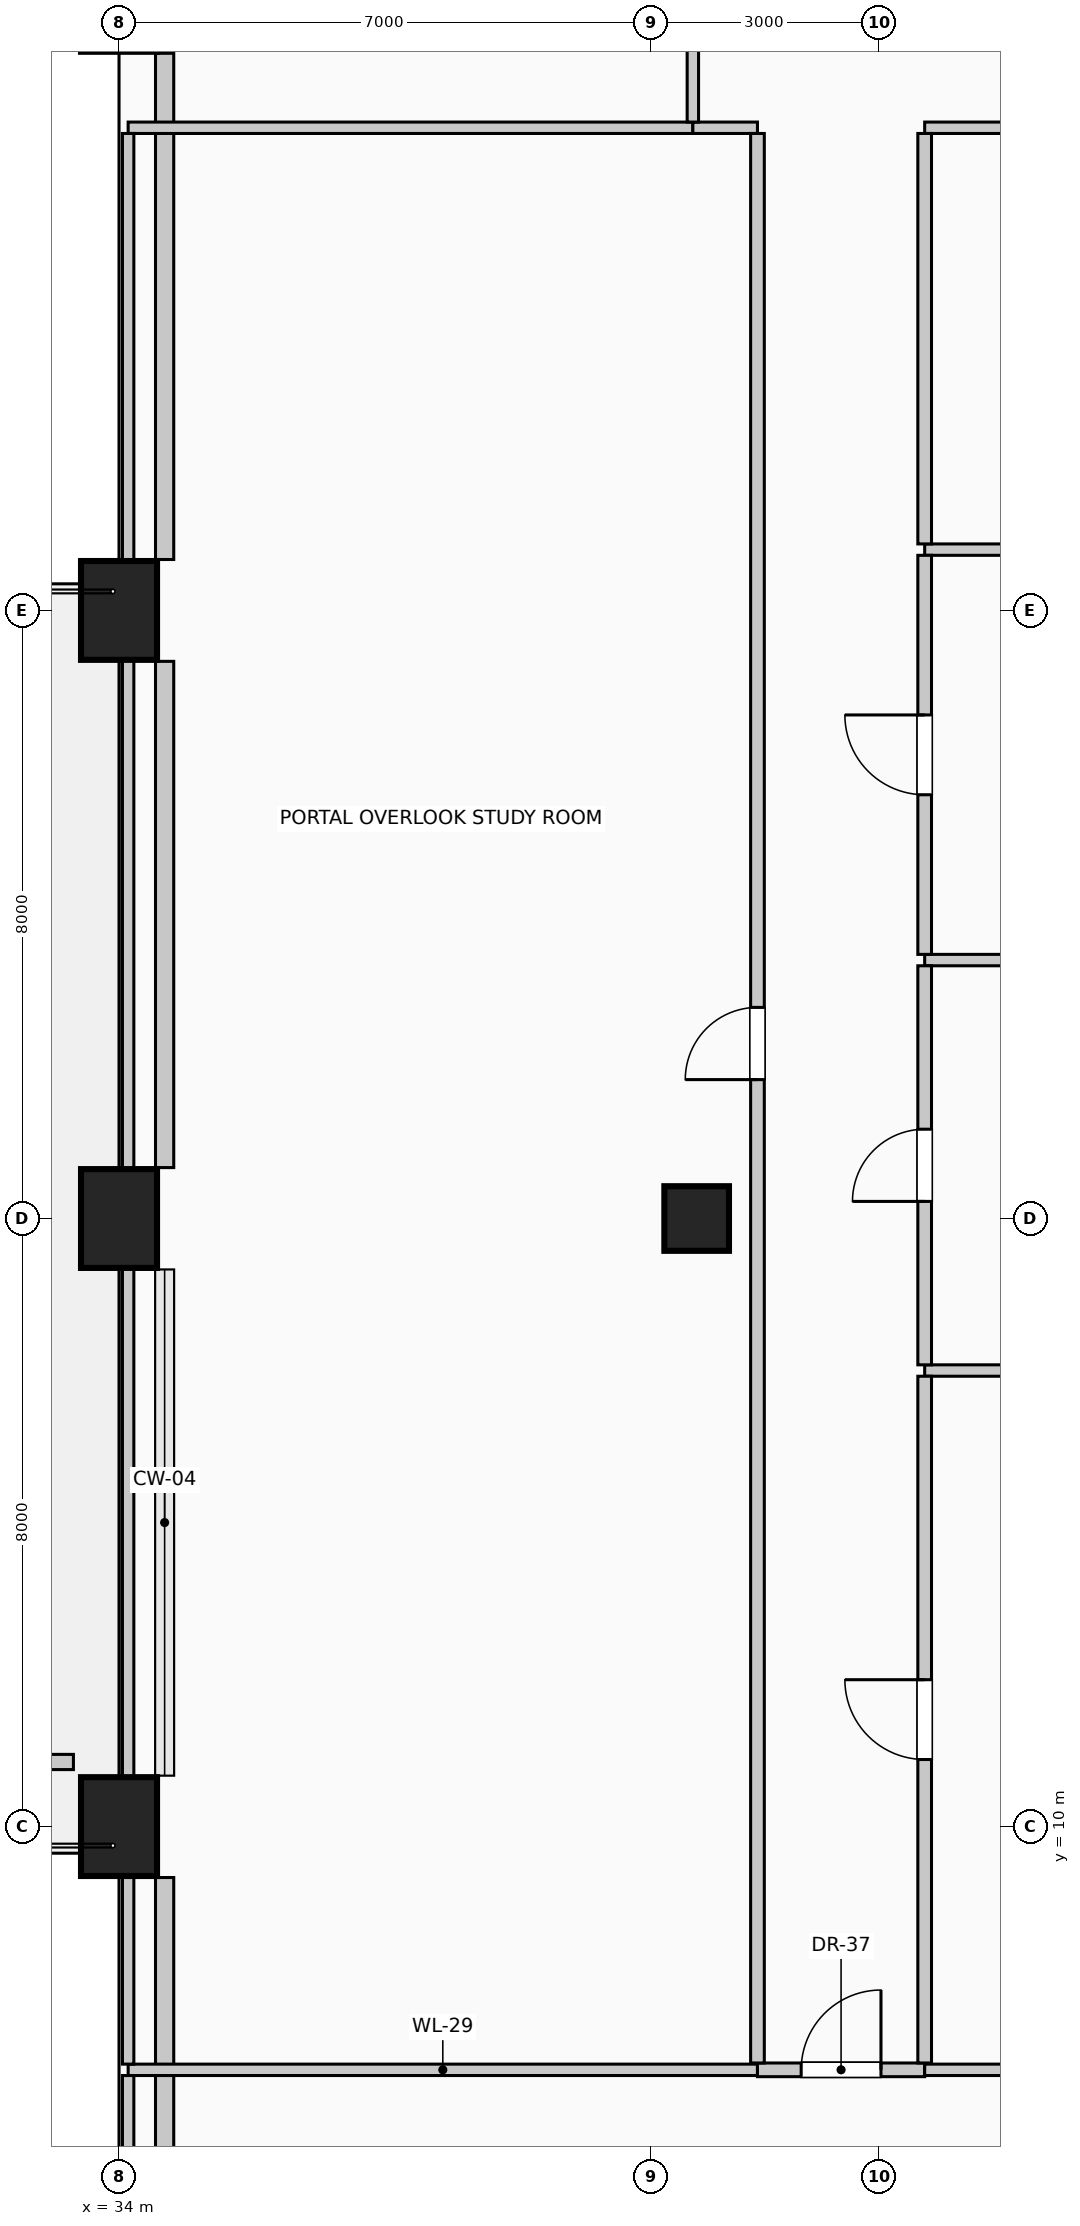
"""IFC4 building model, lengths in metres.
Left out: names, types, materials, properties, quantities, classifications, styles, units other than length and angle.
Written with IfcOpenShell. Run it as: python <this file> out.ifc"""

import sys

from ifc_helpers import new_model, si_unit, direction, frame, frame_2d, origin, origin_2d, place, context, subcontext, project, spatial, rectangle, circle, extrude, element, fill, save


model = new_model("IFC4")
c1 = context("Model", 3, precision=1e-05, world=origin(), true_north=direction((0.0, 1.0)))
c2 = subcontext(c1, "Body", "Model", "MODEL_VIEW")
j1 = project(units=[si_unit("LENGTHUNIT", "METRE"), si_unit("PLANEANGLEUNIT", "RADIAN")], contexts=[c1])
p1 = place(None, origin())
s1 = spatial("IfcSite", under=j1, at=p1, CompositionType="ELEMENT")
p2 = place(p1, origin())
s2 = spatial("IfcBuilding", under=s1, at=p2, CompositionType="ELEMENT")
p3 = place(p2, frame((0.0, 0.0, 182.6)))
s3 = spatial("IfcBuildingStorey", under=s2, at=p3, CompositionType="ELEMENT", Elevation=182.6)
for number, where, z_axis, x_axis in (
    (1, (34.0, 10.0, 0.0), (0.0, 0.0, 1.0), (1.0, 0.0, 0.0)),
    (2, (34.0, 18.0, 0.0), (0.0, 0.0, 1.0), (1.0, 0.0, 0.0)),
    (3, (34.0, 26.0, 0.0), (0.0, 0.0, 1.0), (1.0, 0.0, 0.0)),
    (4, (34.0, 34.0, 0.0), (0.0, 0.0, 1.0), (1.0, 0.0, 0.0)),
):
    element("IfcColumn", number, at=place(p3, frame(where, z_axis=z_axis, x_axis=x_axis)), inside=s3, PredefinedType="COLUMN", context=c2, shape_type="SweptSolid", body=[
        extrude(rectangle(XDim=1.0, YDim=1.3, at=origin_2d()), origin(), (0.0, 0.0, 1.0), 4.0),
    ])
p4 = place(p3, frame((41.6, 18.0, 0.0), z_axis=(0.0, 0.0, 1.0), x_axis=(1.0, 0.0, 0.0)))
e5 = element("IfcColumn", 5, at=p4, inside=s3, PredefinedType="COLUMN", context=c2, shape_type="SweptSolid", body=[
    extrude(circle(Radius=0.425, at=origin_2d()), origin(), (0.0, 0.0, 1.0), 4.0),
])
p5 = place(p3, frame((34.6, 1.27, 0.0), z_axis=(0.0, 0.0, 1.0), x_axis=(0.0, 1.0, 0.0)))
e6 = element("IfcWall", 6, at=p5, inside=s3, PredefinedType="SOLIDWALL", context=c2, shape_type="SweptSolid", body=[
    extrude(rectangle(XDim=8.06, YDim=0.24, at=frame_2d((4.03, 0.0))), origin(), (0.0, 0.0, 1.0), 3.75),
])
p6 = place(p5, frame((1.22, 0.0, 0.42)))
e7 = element("IfcOpeningElement", 7, at=p6, cuts=e6, PredefinedType="OPENING", context=c2, shape_type="SweptSolid", body=[
    extrude(rectangle(XDim=2.2, YDim=1.95, at=frame_2d((1.1, 0.975))), frame((0.0, 0.13, 0.0), z_axis=(0.0, -1.0, 0.0), x_axis=(1.0, 0.0, 0.0)), (0.0, 0.0, 1.0), 0.26),
])
for number, where, z_axis, x_axis in (
    (8, (34.6, 18.67, 0.0), (0.0, 0.0, 1.0), (0.0, 1.0, 0.0)),
    (9, (34.6, 26.67, 0.0), (0.0, 0.0, 1.0), (0.0, 1.0, 0.0)),
):
    element("IfcWall", number, at=place(p3, frame(where, z_axis=z_axis, x_axis=x_axis)), inside=s3, PredefinedType="SOLIDWALL", context=c2, shape_type="SweptSolid", body=[
        extrude(rectangle(XDim=6.66, YDim=0.24, at=frame_2d((3.33, 0.0))), origin(), (0.0, 0.0, 1.0), 3.75),
    ])
p7 = place(p3, frame((24.6, 10.85, 0.0), z_axis=(0.0, 0.0, 1.0), x_axis=(1.0, 0.0, 0.0)))
e10 = element("IfcWall", 10, at=p7, inside=s3, PredefinedType="USERDEFINED", context=c2, shape_type="SweptSolid", body=[
    extrude(rectangle(XDim=8.8, YDim=0.2, at=frame_2d((4.4, 0.0))), origin(), (0.0, 0.0, 1.0), 0.55),
])
p8 = place(p3, frame((34.12, 6.8, 0.0), z_axis=(0.0, 0.0, 1.0), x_axis=(1.0, 0.0, 0.0)))
e11 = element("IfcWall", 11, at=p8, inside=s3, PredefinedType="PARTITIONING", context=c2, shape_type="SweptSolid", body=[
    extrude(rectangle(XDim=8.28, YDim=0.15, at=frame_2d((4.14, 0.0))), origin(), (0.0, 0.0, 1.0), 3.245),
])
p9 = place(p3, frame((42.4, 6.8, 0.0), z_axis=(0.0, 0.0, 1.0), x_axis=(1.0, 0.0, 0.0)))
e12 = element("IfcWall", 12, at=p9, inside=s3, PredefinedType="PARTITIONING", context=c2, shape_type="SweptSolid", body=[
    extrude(rectangle(XDim=2.2, YDim=0.18, at=frame_2d((1.1, 0.0))), origin(), (0.0, 0.0, 1.0), 3.245),
])
p10 = place(p9, frame((0.575, 0.0, 0.0)))
e13 = element("IfcOpeningElement", 13, at=p10, cuts=e12, PredefinedType="OPENING", context=c2, shape_type="SweptSolid", body=[
    extrude(rectangle(XDim=1.05, YDim=2.15, at=frame_2d((0.525, 1.075))), frame((0.0, 0.1, 0.0), z_axis=(0.0, -1.0, 0.0), x_axis=(1.0, 0.0, 0.0)), (0.0, 0.0, 1.0), 0.2),
])
p11 = place(p3, frame((44.6, 6.8, 0.0), z_axis=(0.0, 0.0, 1.0), x_axis=(1.0, 0.0, 0.0)))
e14 = element("IfcWall", 14, at=p11, inside=s3, PredefinedType="PARTITIONING", context=c2, shape_type="SweptSolid", body=[
    extrude(rectangle(XDim=12.68, YDim=0.15, at=frame_2d((6.34, 0.0))), origin(), (0.0, 0.0, 1.0), 3.245),
])
for number, where, z_axis, x_axis in (
    (15, (44.6, 16.0, 0.0), (0.0, 0.0, 1.0), (1.0, 0.0, 0.0)),
    (16, (44.6, 21.4, 0.0), (0.0, 0.0, 1.0), (1.0, 0.0, 0.0)),
):
    element("IfcWall", number, at=place(p3, frame(where, z_axis=z_axis, x_axis=x_axis)), inside=s3, PredefinedType="PARTITIONING", context=c2, shape_type="SweptSolid", body=[
        extrude(rectangle(XDim=12.68, YDim=0.15, at=frame_2d((6.34, 0.0))), origin(), (0.0, 0.0, 1.0), 3.75),
    ])
p12 = place(p3, frame((44.6, 26.8, 0.0), z_axis=(0.0, 0.0, 1.0), x_axis=(1.0, 0.0, 0.0)))
e17 = element("IfcWall", 17, at=p12, inside=s3, PredefinedType="PARTITIONING", context=c2, shape_type="SweptSolid", body=[
    extrude(rectangle(XDim=7.7, YDim=0.15, at=frame_2d((3.85, 0.0))), origin(), (0.0, 0.0, 1.0), 3.75),
])
p13 = place(p3, frame((34.12, 32.35, 0.0), z_axis=(0.0, 0.0, 1.0), x_axis=(1.0, 0.0, 0.0)))
e18 = element("IfcWall", 18, at=p13, inside=s3, PredefinedType="PARTITIONING", context=c2, shape_type="SweptSolid", body=[
    extrude(rectangle(XDim=7.43, YDim=0.15, at=frame_2d((3.715, 0.0))), origin(), (0.0, 0.0, 1.0), 3.75),
])
p14 = place(p3, frame((41.55, 32.35, 0.0), z_axis=(0.0, 0.0, 1.0), x_axis=(1.0, 0.0, 0.0)))
e19 = element("IfcWall", 19, at=p14, inside=s3, PredefinedType="PARTITIONING", context=c2, shape_type="SweptSolid", body=[
    extrude(rectangle(XDim=0.85, YDim=0.15, at=frame_2d((0.425, 0.0))), origin(), (0.0, 0.0, 1.0), 3.75),
])
p15 = place(p3, frame((44.6, 32.35, 0.0), z_axis=(0.0, 0.0, 1.0), x_axis=(1.0, 0.0, 0.0)))
e20 = element("IfcWall", 20, at=p15, inside=s3, PredefinedType="PARTITIONING", context=c2, shape_type="SweptSolid", body=[
    extrude(rectangle(XDim=7.7, YDim=0.15, at=frame_2d((3.85, 0.0))), origin(), (0.0, 0.0, 1.0), 3.75),
])
p16 = place(p15, frame((3.375, 0.0, 0.0)))
e21 = element("IfcOpeningElement", 21, at=p16, cuts=e20, PredefinedType="OPENING", context=c2, shape_type="SweptSolid", body=[
    extrude(rectangle(XDim=0.95, YDim=2.15, at=frame_2d((0.475, 1.075))), frame((0.0, 0.085, 0.0), z_axis=(0.0, -1.0, 0.0), x_axis=(1.0, 0.0, 0.0)), (0.0, 0.0, 1.0), 0.17),
])
p17 = place(p3, frame((34.12, 1.25, 0.0), z_axis=(0.0, 0.0, 1.0), x_axis=(0.0, 1.0, 0.0)))
e22 = element("IfcWall", 22, at=p17, inside=s3, PredefinedType="PARTITIONING", context=c2, shape_type="SweptSolid", body=[
    extrude(rectangle(XDim=5.475, YDim=0.15, at=frame_2d((2.738, 0.0))), origin(), (0.0, 0.0, 1.0), 3.145),
])
p18 = place(p3, frame((34.12, 6.875, 0.0), z_axis=(0.0, 0.0, 1.0), x_axis=(0.0, 1.0, 0.0)))
e23 = element("IfcWall", 23, at=p18, inside=s3, PredefinedType="PARTITIONING", context=c2, shape_type="SweptSolid", body=[
    extrude(rectangle(XDim=2.475, YDim=0.15, at=frame_2d((1.238, 0.0))), origin(), (0.0, 0.0, 1.0), 3.145),
])
for number, where, z_axis, x_axis in (
    (24, (34.12, 10.65, 0.0), (0.0, 0.0, 1.0), (0.0, 1.0, 0.0)),
    (25, (34.12, 18.65, 0.0), (0.0, 0.0, 1.0), (0.0, 1.0, 0.0)),
):
    element("IfcWall", number, at=place(p3, frame(where, z_axis=z_axis, x_axis=x_axis)), inside=s3, PredefinedType="PARTITIONING", context=c2, shape_type="SweptSolid", body=[
        extrude(rectangle(XDim=6.7, YDim=0.15, at=frame_2d((3.35, 0.0))), origin(), (0.0, 0.0, 1.0), 3.145),
    ])
p19 = place(p3, frame((34.12, 26.65, 0.0), z_axis=(0.0, 0.0, 1.0), x_axis=(0.0, 1.0, 0.0)))
e26 = element("IfcWall", 26, at=p19, inside=s3, PredefinedType="PARTITIONING", context=c2, shape_type="SweptSolid", body=[
    extrude(rectangle(XDim=5.625, YDim=0.15, at=frame_2d((2.812, 0.0))), origin(), (0.0, 0.0, 1.0), 3.145),
])
p20 = place(p3, frame((41.55, 32.425, 0.0), z_axis=(0.0, 0.0, 1.0), x_axis=(0.0, 1.0, 0.0)))
e27 = element("IfcWall", 27, at=p20, inside=s3, PredefinedType="PARTITIONING", context=c2, shape_type="SweptSolid", body=[
    extrude(rectangle(XDim=1.15, YDim=0.15, at=frame_2d((0.575, 0.0))), origin(), (0.0, 0.0, 1.0), 3.145),
])
p21 = place(p3, frame((42.4, 6.89, 0.0), z_axis=(0.0, 0.0, 1.0), x_axis=(0.0, 1.0, 0.0)))
e28 = element("IfcWall", 28, at=p21, inside=s3, PredefinedType="PARTITIONING", context=c2, shape_type="SweptSolid", body=[
    extrude(rectangle(XDim=25.385, YDim=0.18, at=frame_2d((12.692, 0.0))), origin(), (0.0, 0.0, 1.0), 3.75),
])
p22 = place(p21, frame((12.938, 0.0, 0.0)))
e29 = element("IfcOpeningElement", 29, at=p22, cuts=e28, PredefinedType="OPENING", context=c2, shape_type="SweptSolid", body=[
    extrude(rectangle(XDim=0.95, YDim=2.15, at=frame_2d((0.475, 1.075))), frame((0.0, 0.1, 0.0), z_axis=(0.0, -1.0, 0.0), x_axis=(1.0, 0.0, 0.0)), (0.0, 0.0, 1.0), 0.2),
])
p23 = place(p3, frame((44.6, 6.89, 0.0), z_axis=(0.0, 0.0, 1.0), x_axis=(0.0, 1.0, 0.0)))
e30 = element("IfcWall", 30, at=p23, inside=s3, PredefinedType="PARTITIONING", context=c2, shape_type="SweptSolid", body=[
    extrude(rectangle(XDim=9.035, YDim=0.18, at=frame_2d((4.518, 0.0))), origin(), (0.0, 0.0, 1.0), 3.75),
])
p24 = place(p23, frame((3.992, 0.0, 0.0)))
e31 = element("IfcOpeningElement", 31, at=p24, cuts=e30, PredefinedType="OPENING", context=c2, shape_type="SweptSolid", body=[
    extrude(rectangle(XDim=1.05, YDim=2.15, at=frame_2d((0.525, 1.075))), frame((0.0, 0.1, 0.0), z_axis=(0.0, -1.0, 0.0), x_axis=(1.0, 0.0, 0.0)), (0.0, 0.0, 1.0), 0.2),
])
p25 = place(p3, frame((44.6, 16.075, 0.0), z_axis=(0.0, 0.0, 1.0), x_axis=(0.0, 1.0, 0.0)))
e32 = element("IfcWall", 32, at=p25, inside=s3, PredefinedType="PARTITIONING", context=c2, shape_type="SweptSolid", body=[
    extrude(rectangle(XDim=5.25, YDim=0.18, at=frame_2d((2.625, 0.0))), origin(), (0.0, 0.0, 1.0), 3.75),
])
p26 = place(p25, frame((2.15, 0.0, 0.0)))
e33 = element("IfcOpeningElement", 33, at=p26, cuts=e32, PredefinedType="OPENING", context=c2, shape_type="SweptSolid", body=[
    extrude(rectangle(XDim=0.95, YDim=2.15, at=frame_2d((0.475, 1.075))), frame((0.0, 0.1, 0.0), z_axis=(0.0, -1.0, 0.0), x_axis=(1.0, 0.0, 0.0)), (0.0, 0.0, 1.0), 0.2),
])
p27 = place(p3, frame((44.6, 21.475, 0.0), z_axis=(0.0, 0.0, 1.0), x_axis=(0.0, 1.0, 0.0)))
e34 = element("IfcWall", 34, at=p27, inside=s3, PredefinedType="PARTITIONING", context=c2, shape_type="SweptSolid", body=[
    extrude(rectangle(XDim=5.25, YDim=0.18, at=frame_2d((2.625, 0.0))), origin(), (0.0, 0.0, 1.0), 3.75),
])
p28 = place(p27, frame((2.1, 0.0, 0.0)))
e35 = element("IfcOpeningElement", 35, at=p28, cuts=e34, PredefinedType="OPENING", context=c2, shape_type="SweptSolid", body=[
    extrude(rectangle(XDim=1.05, YDim=2.15, at=frame_2d((0.525, 1.075))), frame((0.0, 0.1, 0.0), z_axis=(0.0, -1.0, 0.0), x_axis=(1.0, 0.0, 0.0)), (0.0, 0.0, 1.0), 0.2),
])
p29 = place(p3, frame((44.6, 26.875, 0.0), z_axis=(0.0, 0.0, 1.0), x_axis=(0.0, 1.0, 0.0)))
e36 = element("IfcWall", 36, at=p29, inside=s3, PredefinedType="PARTITIONING", context=c2, shape_type="SweptSolid", body=[
    extrude(rectangle(XDim=5.4, YDim=0.18, at=frame_2d((2.7, 0.0))), origin(), (0.0, 0.0, 1.0), 3.75),
])
p30 = place(p10, origin())
e37 = element("IfcDoor", 37, at=p30, inside=s3, OperationType="SINGLE_SWING_RIGHT", PredefinedType="DOOR", context=c2, shape_type="SweptSolid", body=[
    extrude(rectangle(XDim=1.05, YDim=2.15, at=frame_2d((0.525, 1.075))), frame((0.0, 0.025, 0.0), z_axis=(0.0, -1.0, 0.0), x_axis=(1.0, 0.0, 0.0)), (0.0, 0.0, 1.0), 0.05),
])
fill(e13, e37)
p31 = place(p22, origin())
e38 = element("IfcDoor", 38, at=p31, inside=s3, OperationType="SINGLE_SWING_LEFT", PredefinedType="DOOR", context=c2, shape_type="SweptSolid", body=[
    extrude(rectangle(XDim=0.95, YDim=2.15, at=frame_2d((0.475, 1.075))), frame((0.0, 0.025, 0.0), z_axis=(0.0, -1.0, 0.0), x_axis=(1.0, 0.0, 0.0)), (0.0, 0.0, 1.0), 0.05),
])
fill(e29, e38)
p32 = place(p24, origin())
e39 = element("IfcDoor", 39, at=p32, inside=s3, OperationType="SINGLE_SWING_RIGHT", PredefinedType="DOOR", context=c2, shape_type="SweptSolid", body=[
    extrude(rectangle(XDim=1.05, YDim=2.15, at=frame_2d((0.525, 1.075))), frame((0.0, 0.025, 0.0), z_axis=(0.0, -1.0, 0.0), x_axis=(1.0, 0.0, 0.0)), (0.0, 0.0, 1.0), 0.05),
])
fill(e31, e39)
p33 = place(p26, origin())
e40 = element("IfcDoor", 40, at=p33, inside=s3, OperationType="SINGLE_SWING_LEFT", PredefinedType="DOOR", context=c2, shape_type="SweptSolid", body=[
    extrude(rectangle(XDim=0.95, YDim=2.15, at=frame_2d((0.475, 1.075))), frame((0.0, 0.025, 0.0), z_axis=(0.0, -1.0, 0.0), x_axis=(1.0, 0.0, 0.0)), (0.0, 0.0, 1.0), 0.05),
])
fill(e33, e40)
p34 = place(p28, origin())
e41 = element("IfcDoor", 41, at=p34, inside=s3, OperationType="SINGLE_SWING_RIGHT", PredefinedType="DOOR", context=c2, shape_type="SweptSolid", body=[
    extrude(rectangle(XDim=1.05, YDim=2.15, at=frame_2d((0.525, 1.075))), frame((0.0, 0.025, 0.0), z_axis=(0.0, -1.0, 0.0), x_axis=(1.0, 0.0, 0.0)), (0.0, 0.0, 1.0), 0.05),
])
fill(e35, e41)
save(model, sys.argv[1])
